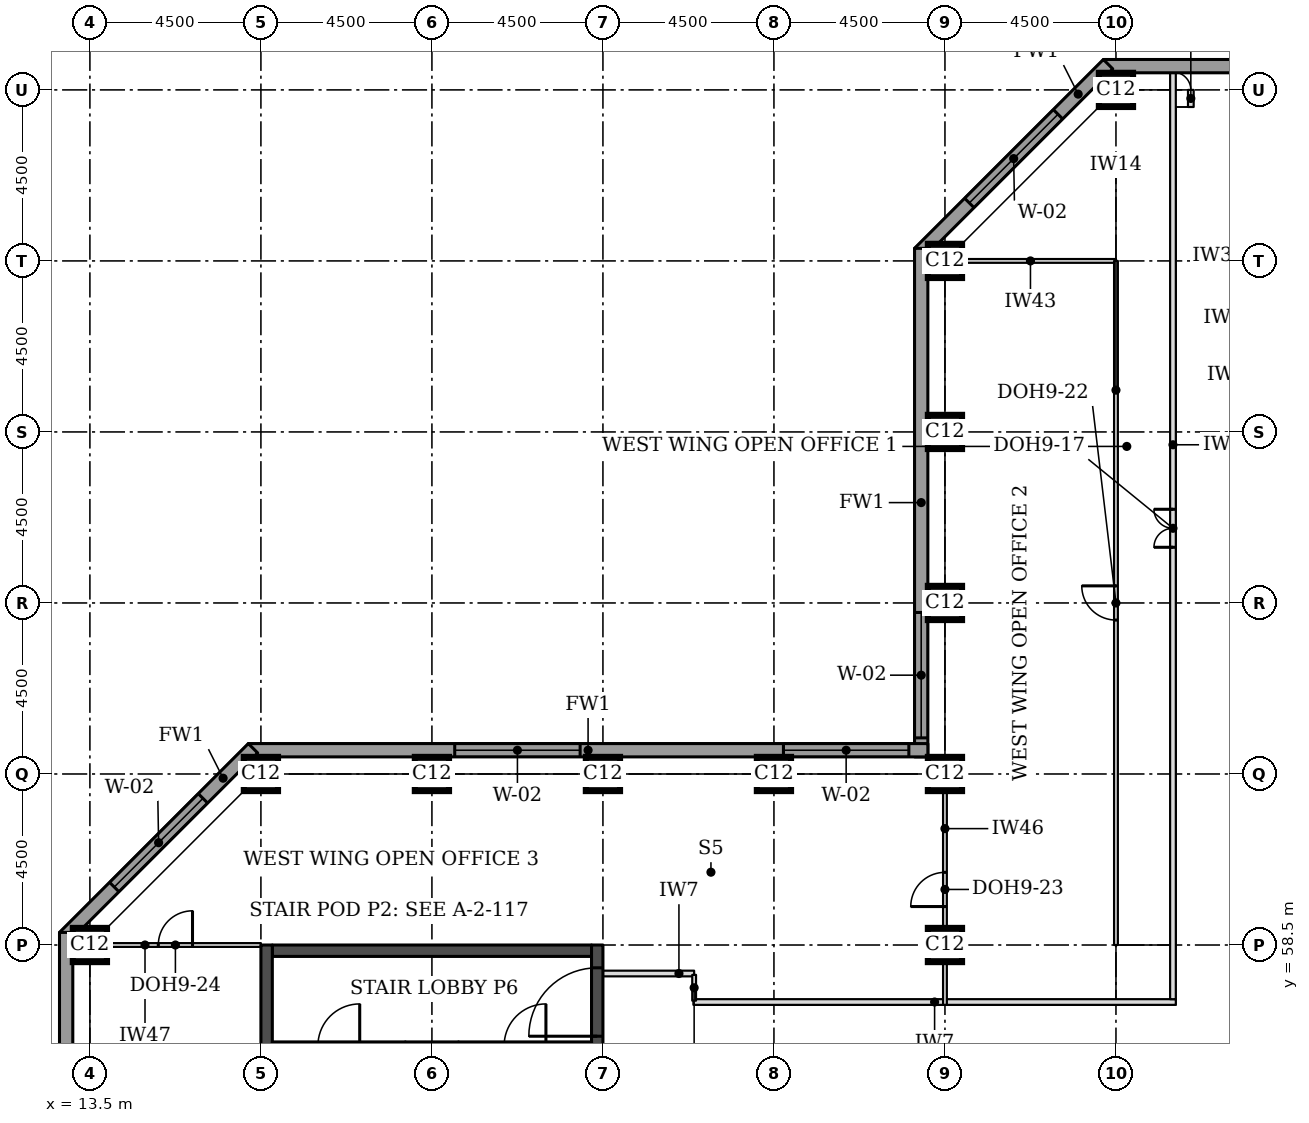
"""IFC4 building model, lengths in metres.
Left out: names, types, materials, properties, quantities, classifications, styles, units other than length and angle.
Written with IfcOpenShell. Run it as: python <this file> out.ifc"""

import sys

from ifc_helpers import new_model, si_unit, direction, frame, frame_2d, origin, origin_2d, place, context, subcontext, project, spatial, rectangle, extrude, element, fill, save


model = new_model("IFC4")
c1 = context("Model", 3, precision=1e-05, world=origin(), true_north=direction((0.0, 1.0)))
c2 = subcontext(c1, "Body", "Model", "MODEL_VIEW")
j1 = project(units=[si_unit("LENGTHUNIT", "METRE"), si_unit("PLANEANGLEUNIT", "RADIAN")], contexts=[c1])
p1 = place(None, origin())
s1 = spatial("IfcSite", under=j1, at=p1, CompositionType="ELEMENT")
p2 = place(p1, origin())
s2 = spatial("IfcBuilding", under=s1, at=p2, CompositionType="ELEMENT")
p3 = place(p2, frame((0.0, 0.0, 211.9)))
s3 = spatial("IfcBuildingStorey", under=s2, at=p3, CompositionType="ELEMENT", Elevation=211.9)
for number, where, z_axis, x_axis in (
    (1, (13.5, 58.5, 0.0), (0.0, 0.0, 1.0), (1.0, 0.0, 0.0)),
    (2, (36.0, 58.5, 0.0), (0.0, 0.0, 1.0), (1.0, 0.0, 0.0)),
    (3, (18.0, 63.0, 0.0), (0.0, 0.0, 1.0), (1.0, 0.0, 0.0)),
    (4, (22.5, 63.0, 0.0), (0.0, 0.0, 1.0), (1.0, 0.0, 0.0)),
    (5, (27.0, 63.0, 0.0), (0.0, 0.0, 1.0), (1.0, 0.0, 0.0)),
    (6, (31.5, 63.0, 0.0), (0.0, 0.0, 1.0), (1.0, 0.0, 0.0)),
    (7, (36.0, 63.0, 0.0), (0.0, 0.0, 1.0), (1.0, 0.0, 0.0)),
    (8, (36.0, 67.5, 0.0), (0.0, 0.0, 1.0), (1.0, 0.0, 0.0)),
    (9, (36.0, 72.0, 0.0), (0.0, 0.0, 1.0), (1.0, 0.0, 0.0)),
    (10, (36.0, 76.5, 0.0), (0.0, 0.0, 1.0), (1.0, 0.0, 0.0)),
    (11, (40.5, 81.0, 0.0), (0.0, 0.0, 1.0), (1.0, 0.0, 0.0)),
):
    element("IfcColumn", number, at=place(p3, frame(where, z_axis=z_axis, x_axis=x_axis)), inside=s3, PredefinedType="COLUMN", context=c2, shape_type="SweptSolid", body=[
        extrude(rectangle(XDim=0.9, YDim=0.9, at=origin_2d()), origin(), (0.0, 0.0, 1.0), 3.7),
    ])
p4 = place(p3, frame((18.3, 58.35, 0.0), z_axis=(0.0, 0.0, 1.0), x_axis=(1.0, 0.0, 0.0)))
e12 = element("IfcWall", 12, at=p4, inside=s3, PredefinedType="SHEAR", context=c2, shape_type="SweptSolid", body=[
    extrude(rectangle(XDim=8.4, YDim=0.3, at=frame_2d((4.2, 0.0))), origin(), (0.0, 0.0, 1.0), 3.7),
])
p5 = place(p3, frame((18.15, 49.5, 0.0), z_axis=(0.0, 0.0, 1.0), x_axis=(0.0, 1.0, 0.0)))
e13 = element("IfcWall", 13, at=p5, inside=s3, PredefinedType="SHEAR", context=c2, shape_type="SweptSolid", body=[
    extrude(rectangle(XDim=9.0, YDim=0.3, at=frame_2d((4.5, 0.0))), origin(), (0.0, 0.0, 1.0), 3.7),
])
p6 = place(p3, frame((26.85, 49.5, 0.0), z_axis=(0.0, 0.0, 1.0), x_axis=(0.0, 1.0, 0.0)))
e14 = element("IfcWall", 14, at=p6, inside=s3, PredefinedType="SHEAR", context=c2, shape_type="SweptSolid", body=[
    extrude(rectangle(XDim=9.0, YDim=0.3, at=frame_2d((4.5, 0.0))), origin(), (0.0, 0.0, 1.0), 3.7),
])
p7 = place(p6, frame((6.6, 0.0, 0.0)))
e15 = element("IfcOpeningElement", 15, at=p7, cuts=e14, PredefinedType="OPENING", context=c2, shape_type="SweptSolid", body=[
    extrude(rectangle(XDim=1.8, YDim=2.1, at=frame_2d((0.9, 1.05))), frame((0.0, 0.16, 0.0), z_axis=(0.0, -1.0, 0.0), x_axis=(1.0, 0.0, 0.0)), (0.0, 0.0, 1.0), 0.32),
])
p8 = place(p3, frame((72.331, 81.625, 0.0), z_axis=(0.0, 0.0, 1.0), x_axis=(-1.0, 0.0, 0.0)))
e16 = element("IfcWall", 16, at=p8, inside=s3, PredefinedType="STANDARD", context=c2, shape_type="SweptSolid", body=[
    extrude(rectangle(XDim=32.163, YDim=0.35, at=frame_2d((16.081, 0.0))), origin(), (0.0, 0.0, 1.0), 3.525),
])
p9 = place(p8, frame((5.431, 0.0, 0.9)))
e17 = element("IfcOpeningElement", 17, at=p9, cuts=e16, PredefinedType="OPENING", context=c2, shape_type="SweptSolid", body=[
    extrude(rectangle(XDim=3.3, YDim=1.9, at=frame_2d((1.65, 0.95))), frame((0.0, 0.185, 0.0), z_axis=(0.0, -1.0, 0.0), x_axis=(1.0, 0.0, 0.0)), (0.0, 0.0, 1.0), 0.37),
])
p10 = place(p8, frame((9.931, 0.0, 0.9)))
e18 = element("IfcOpeningElement", 18, at=p10, cuts=e16, PredefinedType="OPENING", context=c2, shape_type="SweptSolid", body=[
    extrude(rectangle(XDim=3.3, YDim=1.9, at=frame_2d((1.65, 0.95))), frame((0.0, 0.185, 0.0), z_axis=(0.0, -1.0, 0.0), x_axis=(1.0, 0.0, 0.0)), (0.0, 0.0, 1.0), 0.37),
])
p11 = place(p8, frame((14.431, 0.0, 0.9)))
e19 = element("IfcOpeningElement", 19, at=p11, cuts=e16, PredefinedType="OPENING", context=c2, shape_type="SweptSolid", body=[
    extrude(rectangle(XDim=3.3, YDim=1.9, at=frame_2d((1.65, 0.95))), frame((0.0, 0.185, 0.0), z_axis=(0.0, -1.0, 0.0), x_axis=(1.0, 0.0, 0.0)), (0.0, 0.0, 1.0), 0.37),
])
p12 = place(p8, frame((18.931, 0.0, 0.9)))
e20 = element("IfcOpeningElement", 20, at=p12, cuts=e16, PredefinedType="OPENING", context=c2, shape_type="SweptSolid", body=[
    extrude(rectangle(XDim=3.3, YDim=1.9, at=frame_2d((1.65, 0.95))), frame((0.0, 0.185, 0.0), z_axis=(0.0, -1.0, 0.0), x_axis=(1.0, 0.0, 0.0)), (0.0, 0.0, 1.0), 0.37),
])
p13 = place(p8, frame((23.431, 0.0, 0.9)))
e21 = element("IfcOpeningElement", 21, at=p13, cuts=e16, PredefinedType="OPENING", context=c2, shape_type="SweptSolid", body=[
    extrude(rectangle(XDim=3.3, YDim=1.9, at=frame_2d((1.65, 0.95))), frame((0.0, 0.185, 0.0), z_axis=(0.0, -1.0, 0.0), x_axis=(1.0, 0.0, 0.0)), (0.0, 0.0, 1.0), 0.37),
])
p14 = place(p3, frame((40.292, 81.676, 0.0), z_axis=(0.0, 0.0, 1.0), x_axis=(-0.707106781187, -0.707106781187, 0.0)))
e22 = element("IfcWall", 22, at=p14, inside=s3, PredefinedType="STANDARD", context=c2, shape_type="SweptSolid", body=[
    extrude(rectangle(XDim=7.027, YDim=0.35, at=frame_2d((3.513, 0.0))), origin(), (0.0, 0.0, 1.0), 3.525),
])
p15 = place(p14, frame((1.863, 0.0, 0.9)))
e23 = element("IfcOpeningElement", 23, at=p15, cuts=e22, PredefinedType="OPENING", context=c2, shape_type="SweptSolid", body=[
    extrude(rectangle(XDim=3.3, YDim=1.9, at=frame_2d((1.65, 0.95))), frame((0.0, 0.185, 0.0), z_axis=(0.0, -1.0, 0.0), x_axis=(1.0, 0.0, 0.0)), (0.0, 0.0, 1.0), 0.37),
])
p16 = place(p3, frame((35.375, 76.831, 0.0), z_axis=(0.0, 0.0, 1.0), x_axis=(0.0, -1.0, 0.0)))
e24 = element("IfcWall", 24, at=p16, inside=s3, PredefinedType="STANDARD", context=c2, shape_type="SweptSolid", body=[
    extrude(rectangle(XDim=13.381, YDim=0.35, at=frame_2d((6.691, 0.0))), origin(), (0.0, 0.0, 1.0), 3.525),
])
p17 = place(p16, frame((9.581, 0.0, 0.9)))
e25 = element("IfcOpeningElement", 25, at=p17, cuts=e24, PredefinedType="OPENING", context=c2, shape_type="SweptSolid", body=[
    extrude(rectangle(XDim=3.3, YDim=1.9, at=frame_2d((1.65, 0.95))), frame((0.0, 0.185, 0.0), z_axis=(0.0, -1.0, 0.0), x_axis=(1.0, 0.0, 0.0)), (0.0, 0.0, 1.0), 0.37),
])
p18 = place(p3, frame((35.55, 63.625, 0.0), z_axis=(0.0, 0.0, 1.0), x_axis=(-1.0, 0.0, 0.0)))
e26 = element("IfcWall", 26, at=p18, inside=s3, PredefinedType="STANDARD", context=c2, shape_type="SweptSolid", body=[
    extrude(rectangle(XDim=17.881, YDim=0.35, at=frame_2d((8.941, 0.0))), origin(), (0.0, 0.0, 1.0), 3.525),
])
p19 = place(p18, frame((0.5, 0.0, 0.9)))
e27 = element("IfcOpeningElement", 27, at=p19, cuts=e26, PredefinedType="OPENING", context=c2, shape_type="SweptSolid", body=[
    extrude(rectangle(XDim=3.3, YDim=1.9, at=frame_2d((1.65, 0.95))), frame((0.0, 0.185, 0.0), z_axis=(0.0, -1.0, 0.0), x_axis=(1.0, 0.0, 0.0)), (0.0, 0.0, 1.0), 0.37),
])
p20 = place(p18, frame((9.15, 0.0, 0.9)))
e28 = element("IfcOpeningElement", 28, at=p20, cuts=e26, PredefinedType="OPENING", context=c2, shape_type="SweptSolid", body=[
    extrude(rectangle(XDim=3.3, YDim=1.9, at=frame_2d((1.65, 0.95))), frame((0.0, 0.185, 0.0), z_axis=(0.0, -1.0, 0.0), x_axis=(1.0, 0.0, 0.0)), (0.0, 0.0, 1.0), 0.37),
])
p21 = place(p3, frame((17.792, 63.676, 0.0), z_axis=(0.0, 0.0, 1.0), x_axis=(-0.707106781187, -0.707106781187, 0.0)))
e29 = element("IfcWall", 29, at=p21, inside=s3, PredefinedType="STANDARD", context=c2, shape_type="SweptSolid", body=[
    extrude(rectangle(XDim=7.027, YDim=0.35, at=frame_2d((3.513, 0.0))), origin(), (0.0, 0.0, 1.0), 3.525),
])
p22 = place(p21, frame((1.863, 0.0, 0.9)))
e30 = element("IfcOpeningElement", 30, at=p22, cuts=e29, PredefinedType="OPENING", context=c2, shape_type="SweptSolid", body=[
    extrude(rectangle(XDim=3.3, YDim=1.9, at=frame_2d((1.65, 0.95))), frame((0.0, 0.185, 0.0), z_axis=(0.0, -1.0, 0.0), x_axis=(1.0, 0.0, 0.0)), (0.0, 0.0, 1.0), 0.37),
])
p23 = place(p3, frame((12.875, 58.831, 0.0), z_axis=(0.0, 0.0, 1.0), x_axis=(0.0, -1.0, 0.0)))
e31 = element("IfcWall", 31, at=p23, inside=s3, PredefinedType="STANDARD", context=c2, shape_type="SweptSolid", body=[
    extrude(rectangle(XDim=14.163, YDim=0.35, at=frame_2d((7.081, 0.0))), origin(), (0.0, 0.0, 1.0), 3.525),
])
p24 = place(p23, frame((5.431, 0.0, 0.9)))
e32 = element("IfcOpeningElement", 32, at=p24, cuts=e31, PredefinedType="OPENING", context=c2, shape_type="SweptSolid", body=[
    extrude(rectangle(XDim=3.3, YDim=1.9, at=frame_2d((1.65, 0.95))), frame((0.0, 0.185, 0.0), z_axis=(0.0, -1.0, 0.0), x_axis=(1.0, 0.0, 0.0)), (0.0, 0.0, 1.0), 0.37),
])
p25 = place(p3, frame((29.38, 57.0, 0.0), z_axis=(0.0, 0.0, 1.0), x_axis=(1.0, 0.0, 0.0)))
e33 = element("IfcWall", 33, at=p25, inside=s3, PredefinedType="PARTITIONING", context=c2, shape_type="SweptSolid", body=[
    extrude(rectangle(XDim=12.695, YDim=0.15, at=frame_2d((6.348, 0.0))), origin(), (0.0, 0.0, 1.0), 3.55),
])
p26 = place(p3, frame((42.0, 57.075, 0.0), z_axis=(0.0, 0.0, 1.0), x_axis=(0.0, 1.0, 0.0)))
e34 = element("IfcWall", 34, at=p26, inside=s3, PredefinedType="PARTITIONING", context=c2, shape_type="SweptSolid", body=[
    extrude(rectangle(XDim=24.375, YDim=0.15, at=frame_2d((12.188, 0.0))), origin(), (0.0, 0.0, 1.0), 3.55),
])
p27 = place(p26, frame((11.89, 0.0, 0.0)))
e35 = element("IfcOpeningElement", 35, at=p27, cuts=e34, PredefinedType="OPENING", context=c2, shape_type="SweptSolid", body=[
    extrude(rectangle(XDim=1.0, YDim=2.1, at=frame_2d((0.5, 1.05))), frame((0.0, 0.085, 0.0), z_axis=(0.0, -1.0, 0.0), x_axis=(1.0, 0.0, 0.0)), (0.0, 0.0, 1.0), 0.17),
])
p28 = place(p3, frame((36.0, 76.5, 0.0), z_axis=(0.0, 0.0, 1.0), x_axis=(1.0, 0.0, 0.0)))
e36 = element("IfcWall", 36, at=p28, inside=s3, PredefinedType="PARTITIONING", context=c2, shape_type="SweptSolid", body=[
    extrude(rectangle(XDim=4.5, YDim=0.1, at=frame_2d((2.25, 0.0))), origin(), (0.0, 0.0, 1.0), 3.096),
])
p29 = place(p3, frame((40.5, 76.5, 0.0), z_axis=(0.0, 0.0, 1.0), x_axis=(0.0, -1.0, 0.0)))
e37 = element("IfcWall", 37, at=p29, inside=s3, PredefinedType="PARTITIONING", context=c2, shape_type="SweptSolid", body=[
    extrude(rectangle(XDim=18.0, YDim=0.1, at=frame_2d((9.0, 0.0))), origin(), (0.0, 0.0, 1.0), 3.55),
])
p30 = place(p29, frame((8.55, 0.0, 0.0)))
e38 = element("IfcOpeningElement", 38, at=p30, cuts=e37, PredefinedType="OPENING", context=c2, shape_type="SweptSolid", body=[
    extrude(rectangle(XDim=0.9, YDim=2.1, at=frame_2d((0.45, 1.05))), frame((0.0, 0.06, 0.0), z_axis=(0.0, -1.0, 0.0), x_axis=(1.0, 0.0, 0.0)), (0.0, 0.0, 1.0), 0.12),
])
p31 = place(p3, frame((36.0, 63.0, 0.0), z_axis=(0.0, 0.0, 1.0), x_axis=(0.0, -1.0, 0.0)))
e39 = element("IfcWall", 39, at=p31, inside=s3, PredefinedType="PARTITIONING", context=c2, shape_type="SweptSolid", body=[
    extrude(rectangle(XDim=6.075, YDim=0.1, at=frame_2d((3.038, 0.0))), origin(), (0.0, 0.0, 1.0), 2.8),
])
p32 = place(p31, frame((2.588, 0.0, 0.0)))
e40 = element("IfcOpeningElement", 40, at=p32, cuts=e39, PredefinedType="OPENING", context=c2, shape_type="SweptSolid", body=[
    extrude(rectangle(XDim=0.9, YDim=2.1, at=frame_2d((0.45, 1.05))), frame((0.0, 0.06, 0.0), z_axis=(0.0, -1.0, 0.0), x_axis=(1.0, 0.0, 0.0)), (0.0, 0.0, 1.0), 0.12),
])
p33 = place(p3, frame((13.5, 58.5, 0.0), z_axis=(0.0, 0.0, 1.0), x_axis=(1.0, 0.0, 0.0)))
e41 = element("IfcWall", 41, at=p33, inside=s3, PredefinedType="PARTITIONING", context=c2, shape_type="SweptSolid", body=[
    extrude(rectangle(XDim=4.5, YDim=0.1, at=frame_2d((2.25, 0.0))), origin(), (0.0, 0.0, 1.0), 2.55),
])
p34 = place(p33, frame((1.8, 0.0, 0.0)))
e42 = element("IfcOpeningElement", 42, at=p34, cuts=e41, PredefinedType="OPENING", context=c2, shape_type="SweptSolid", body=[
    extrude(rectangle(XDim=0.9, YDim=2.1, at=frame_2d((0.45, 1.05))), frame((0.0, 0.06, 0.0), z_axis=(0.0, -1.0, 0.0), x_axis=(1.0, 0.0, 0.0)), (0.0, 0.0, 1.0), 0.12),
])
p35 = place(p3, frame((42.47, 80.55, 0.0), z_axis=(0.0, 0.0, 1.0), x_axis=(0.0, 1.0, 0.0)))
e43 = element("IfcWall", 43, at=p35, inside=s3, PredefinedType="PARTITIONING", context=c2, shape_type="SweptSolid", body=[
    extrude(rectangle(XDim=0.45, YDim=0.15, at=frame_2d((0.225, 0.0))), origin(), (0.0, 0.0, 1.0), 3.55),
])
p36 = place(p3, frame((27.0, 57.75, 0.0), z_axis=(0.0, 0.0, 1.0), x_axis=(1.0, 0.0, 0.0)))
e44 = element("IfcWall", 44, at=p36, inside=s3, PredefinedType="PARTITIONING", context=c2, shape_type="SweptSolid", body=[
    extrude(rectangle(XDim=2.4, YDim=0.15, at=frame_2d((1.2, 0.0))), origin(), (0.0, 0.0, 1.0), 3.55),
])
p37 = place(p3, frame((29.4, 57.715, 0.0), z_axis=(0.0, 0.0, 1.0), x_axis=(0.0, -1.0, 0.0)))
e45 = element("IfcWall", 45, at=p37, inside=s3, PredefinedType="PARTITIONING", context=c2, shape_type="SweptSolid", body=[
    extrude(rectangle(XDim=0.68, YDim=0.1, at=frame_2d((0.34, 0.0))), origin(), (0.0, 0.0, 1.0), 3.55),
])
p38 = place(p3, frame((21.8, 55.85, 0.0), z_axis=(0.0, 0.0, 1.0), x_axis=(1.0, 0.0, 0.0)))
e46 = element("IfcWall", 46, at=p38, inside=s3, PredefinedType="SOLIDWALL", context=c2, shape_type="SweptSolid", body=[
    extrude(rectangle(XDim=1.4, YDim=0.2, at=frame_2d((0.7, 0.0))), origin(), (0.0, 0.0, 1.0), 3.55),
])
p39 = place(p3, frame((18.3, 55.85, 0.0), z_axis=(0.0, 0.0, 1.0), x_axis=(1.0, 0.0, 0.0)))
e47 = element("IfcWall", 47, at=p39, inside=s3, PredefinedType="SOLIDWALL", context=c2, shape_type="SweptSolid", body=[
    extrude(rectangle(XDim=3.5, YDim=0.2, at=frame_2d((1.75, 0.0))), origin(), (0.0, 0.0, 1.0), 3.55),
])
p40 = place(p39, frame((1.2, 0.0, 0.0)))
e48 = element("IfcOpeningElement", 48, at=p40, cuts=e47, PredefinedType="OPENING", context=c2, shape_type="SweptSolid", body=[
    extrude(rectangle(XDim=1.1, YDim=2.1, at=frame_2d((0.55, 1.05))), frame((0.0, 0.11, 0.0), z_axis=(0.0, -1.0, 0.0), x_axis=(1.0, 0.0, 0.0)), (0.0, 0.0, 1.0), 0.22),
])
p41 = place(p3, frame((23.2, 55.85, 0.0), z_axis=(0.0, 0.0, 1.0), x_axis=(1.0, 0.0, 0.0)))
e49 = element("IfcWall", 49, at=p41, inside=s3, PredefinedType="SOLIDWALL", context=c2, shape_type="SweptSolid", body=[
    extrude(rectangle(XDim=3.5, YDim=0.2, at=frame_2d((1.75, 0.0))), origin(), (0.0, 0.0, 1.0), 3.55),
])
p42 = place(p41, frame((1.2, 0.0, 0.0)))
e50 = element("IfcOpeningElement", 50, at=p42, cuts=e49, PredefinedType="OPENING", context=c2, shape_type="SweptSolid", body=[
    extrude(rectangle(XDim=1.1, YDim=2.1, at=frame_2d((0.55, 1.05))), frame((0.0, 0.11, 0.0), z_axis=(0.0, -1.0, 0.0), x_axis=(1.0, 0.0, 0.0)), (0.0, 0.0, 1.0), 0.22),
])
p43 = place(p15, origin())
e51 = element("IfcWindow", 51, at=p43, inside=s3, PartitioningType="SINGLE_PANEL", PredefinedType="WINDOW", context=c2, shape_type="SweptSolid", body=[
    extrude(rectangle(XDim=3.3, YDim=1.9, at=frame_2d((1.65, 0.95))), frame((0.0, 0.085, 0.0), z_axis=(0.0, -1.0, 0.0), x_axis=(1.0, 0.0, 0.0)), (0.0, 0.0, 1.0), 0.06),
])
fill(e23, e51)
p44 = place(p17, origin())
e52 = element("IfcWindow", 52, at=p44, inside=s3, PartitioningType="SINGLE_PANEL", PredefinedType="WINDOW", context=c2, shape_type="SweptSolid", body=[
    extrude(rectangle(XDim=3.3, YDim=1.9, at=frame_2d((1.65, 0.95))), frame((0.0, 0.085, 0.0), z_axis=(0.0, -1.0, 0.0), x_axis=(1.0, 0.0, 0.0)), (0.0, 0.0, 1.0), 0.06),
])
fill(e25, e52)
p45 = place(p19, origin())
e53 = element("IfcWindow", 53, at=p45, inside=s3, PartitioningType="SINGLE_PANEL", PredefinedType="WINDOW", context=c2, shape_type="SweptSolid", body=[
    extrude(rectangle(XDim=3.3, YDim=1.9, at=frame_2d((1.65, 0.95))), frame((0.0, 0.085, 0.0), z_axis=(0.0, -1.0, 0.0), x_axis=(1.0, 0.0, 0.0)), (0.0, 0.0, 1.0), 0.06),
])
fill(e27, e53)
p46 = place(p20, origin())
e54 = element("IfcWindow", 54, at=p46, inside=s3, PartitioningType="SINGLE_PANEL", PredefinedType="WINDOW", context=c2, shape_type="SweptSolid", body=[
    extrude(rectangle(XDim=3.3, YDim=1.9, at=frame_2d((1.65, 0.95))), frame((0.0, 0.085, 0.0), z_axis=(0.0, -1.0, 0.0), x_axis=(1.0, 0.0, 0.0)), (0.0, 0.0, 1.0), 0.06),
])
fill(e28, e54)
p47 = place(p22, origin())
e55 = element("IfcWindow", 55, at=p47, inside=s3, PartitioningType="SINGLE_PANEL", PredefinedType="WINDOW", context=c2, shape_type="SweptSolid", body=[
    extrude(rectangle(XDim=3.3, YDim=1.9, at=frame_2d((1.65, 0.95))), frame((0.0, 0.085, 0.0), z_axis=(0.0, -1.0, 0.0), x_axis=(1.0, 0.0, 0.0)), (0.0, 0.0, 1.0), 0.06),
])
fill(e30, e55)
p48 = place(p27, origin())
e56 = element("IfcDoor", 56, at=p48, inside=s3, OperationType="DOUBLE_DOOR_SINGLE_SWING", PredefinedType="DOOR", context=c2, shape_type="SweptSolid", body=[
    extrude(rectangle(XDim=1.0, YDim=2.1, at=frame_2d((0.5, 1.05))), frame((0.0, 0.025, 0.0), z_axis=(0.0, -1.0, 0.0), x_axis=(1.0, 0.0, 0.0)), (0.0, 0.0, 1.0), 0.05),
])
fill(e35, e56)
p49 = place(p30, frame((0.9, 0.0, 0.0), z_axis=(0.0, 0.0, 1.0), x_axis=(-1.0, 0.0, 0.0)))
e57 = element("IfcDoor", 57, at=p49, inside=s3, OperationType="SINGLE_SWING_RIGHT", PredefinedType="DOOR", context=c2, shape_type="SweptSolid", body=[
    extrude(rectangle(XDim=0.9, YDim=2.1, at=frame_2d((0.45, 1.05))), frame((0.0, 0.025, 0.0), z_axis=(0.0, -1.0, 0.0), x_axis=(1.0, 0.0, 0.0)), (0.0, 0.0, 1.0), 0.05),
])
fill(e38, e57)
p50 = place(p32, frame((0.9, 0.0, 0.0), z_axis=(0.0, 0.0, 1.0), x_axis=(-1.0, 0.0, 0.0)))
e58 = element("IfcDoor", 58, at=p50, inside=s3, OperationType="SINGLE_SWING_LEFT", PredefinedType="DOOR", context=c2, shape_type="SweptSolid", body=[
    extrude(rectangle(XDim=0.9, YDim=2.1, at=frame_2d((0.45, 1.05))), frame((0.0, 0.025, 0.0), z_axis=(0.0, -1.0, 0.0), x_axis=(1.0, 0.0, 0.0)), (0.0, 0.0, 1.0), 0.05),
])
fill(e40, e58)
p51 = place(p34, origin())
e59 = element("IfcDoor", 59, at=p51, inside=s3, OperationType="SINGLE_SWING_RIGHT", PredefinedType="DOOR", context=c2, shape_type="SweptSolid", body=[
    extrude(rectangle(XDim=0.9, YDim=2.1, at=frame_2d((0.45, 1.05))), frame((0.0, 0.025, 0.0), z_axis=(0.0, -1.0, 0.0), x_axis=(1.0, 0.0, 0.0)), (0.0, 0.0, 1.0), 0.05),
])
fill(e42, e59)
p52 = place(p7, origin())
e60 = element("IfcDoor", 60, at=p52, inside=s3, OperationType="SINGLE_SWING_LEFT", PredefinedType="DOOR", context=c2, shape_type="SweptSolid", body=[
    extrude(rectangle(XDim=1.8, YDim=2.1, at=frame_2d((0.9, 1.05))), frame((0.0, 0.025, 0.0), z_axis=(0.0, -1.0, 0.0), x_axis=(1.0, 0.0, 0.0)), (0.0, 0.0, 1.0), 0.05),
])
fill(e15, e60)
save(model, sys.argv[1])
